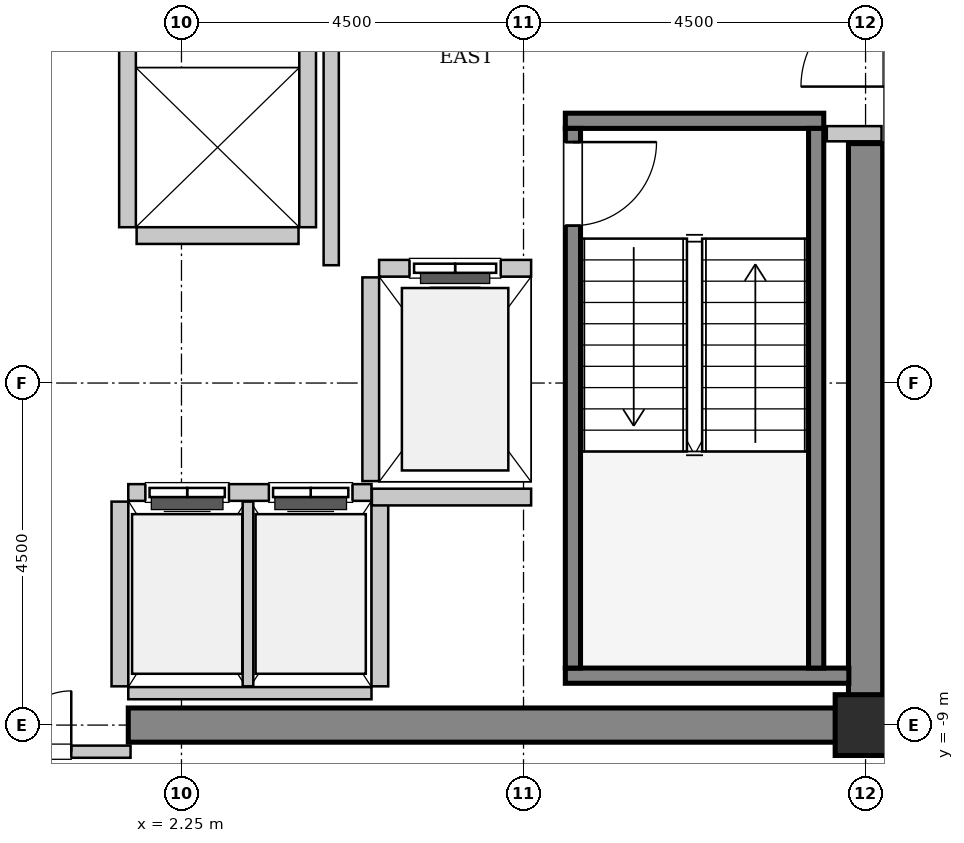
"""IFC4 building model, lengths in metres.
Left out: names, types, materials, properties, quantities, classifications, styles, units other than length and angle.
Written with IfcOpenShell. Run it as: python <this file> out.ifc"""

import sys

from ifc_helpers import new_model, si_unit, direction, frame, frame_2d, origin, origin_2d, place, context, subcontext, project, spatial, rectangle, hollow_rectangle, extrude, source, transform, mapped, element, fill, save


model = new_model("IFC4")
c1 = context("Model", 3, precision=1e-05, world=origin(), true_north=direction((0.0, 1.0)))
c2 = subcontext(c1, "Body", "Model", "MODEL_VIEW")
j1 = project(units=[si_unit("LENGTHUNIT", "METRE"), si_unit("PLANEANGLEUNIT", "RADIAN")], contexts=[c1])
p1 = place(None, origin())
s1 = spatial("IfcSite", under=j1, at=p1, CompositionType="ELEMENT")
p2 = place(p1, origin())
s2 = spatial("IfcBuilding", under=s1, at=p2, CompositionType="ELEMENT")
p3 = place(p2, frame((0.0, 0.0, 256.0)))
s3 = spatial("IfcBuildingStorey", under=s2, at=p3, CompositionType="ELEMENT", Elevation=256.0)
m1 = source(origin(), c2, "Body", "SweptSolid", [
    extrude(rectangle(XDim=9.925, YDim=0.45, at=frame_2d((4.962, 0.0))), origin(), (0.0, 0.0, 1.0), 3.8),
])
p4 = place(p3, frame((1.55, -9.0, 0.0), z_axis=(0.0, 0.0, 1.0), x_axis=(1.0, 0.0, 0.0)))
e1 = element("IfcWall", 1, at=p4, inside=s3, PredefinedType="SHEAR", context=c2, shape_type="MappedRepresentation", body=[
    mapped(m1, transform((0.0, 0.0, 0.0), x_axis=(1.0, 0.0, 0.0), y_axis=(0.0, 1.0, 0.0), z_axis=(0.0, 0.0, 1.0), scale=1.0)),
])
m2 = source(origin(), c2, "Body", "SweptSolid", [
    extrude(rectangle(XDim=7.425, YDim=0.45, at=frame_2d((3.712, 0.0))), origin(), (0.0, 0.0, 1.0), 3.8),
])
p5 = place(p3, frame((11.25, -8.775, 0.0), z_axis=(0.0, 0.0, 1.0), x_axis=(0.0, 1.0, 0.0)))
e2 = element("IfcWall", 2, at=p5, inside=s3, PredefinedType="SHEAR", context=c2, shape_type="MappedRepresentation", body=[
    mapped(m2, transform((0.0, 0.0, 0.0), x_axis=(1.0, 0.0, 0.0), y_axis=(0.0, 1.0, 0.0), z_axis=(0.0, 0.0, 1.0), scale=1.0)),
])
m3 = source(origin(), c2, "Body", "SweptSolid", [
    extrude(hollow_rectangle(XDim=0.8, YDim=0.8, WallThickness=0.04, InnerFilletRadius=0.04, OuterFilletRadius=0.08, at=origin_2d()), origin(), (0.0, 0.0, 1.0), 3.8),
])
p6 = place(p3, frame((11.25, -9.0, 0.0), z_axis=(0.0, 0.0, 1.0), x_axis=(1.0, 0.0, 0.0)))
e3 = element("IfcColumn", 3, at=p6, inside=s3, PredefinedType="COLUMN", context=c2, shape_type="MappedRepresentation", body=[
    mapped(m3, transform((0.0, 0.0, 0.0), x_axis=(1.0, 0.0, 0.0), y_axis=(0.0, 1.0, 0.0), z_axis=(0.0, 0.0, 1.0), scale=1.0)),
])
m4 = source(origin(), c2, "Body", "SweptSolid", [
    extrude(rectangle(XDim=3.4, YDim=0.2, at=frame_2d((1.7, 0.0))), origin(), (0.0, 0.0, 1.0), 3.8),
])
p7 = place(p3, frame((7.3, -1.05, 0.0), z_axis=(0.0, 0.0, 1.0), x_axis=(1.0, 0.0, 0.0)))
e4 = element("IfcWall", 4, at=p7, inside=s3, PredefinedType="SOLIDWALL", context=c2, shape_type="MappedRepresentation", body=[
    mapped(m4, transform((0.0, 0.0, 0.0), x_axis=(1.0, 0.0, 0.0), y_axis=(0.0, 1.0, 0.0), z_axis=(0.0, 0.0, 1.0), scale=1.0)),
])
m5 = source(origin(), c2, "Body", "SweptSolid", [
    extrude(rectangle(XDim=3.73, YDim=0.2, at=frame_2d((1.865, 0.0))), origin(), (0.0, 0.0, 1.0), 3.8),
])
p8 = place(p3, frame((7.3, -8.35, 0.0), z_axis=(0.0, 0.0, 1.0), x_axis=(1.0, 0.0, 0.0)))
e5 = element("IfcWall", 5, at=p8, inside=s3, PredefinedType="SOLIDWALL", context=c2, shape_type="MappedRepresentation", body=[
    mapped(m5, transform((0.0, 0.0, 0.0), x_axis=(1.0, 0.0, 0.0), y_axis=(0.0, 1.0, 0.0), z_axis=(0.0, 0.0, 1.0), scale=1.0)),
])
m6 = source(origin(), c2, "Body", "SweptSolid", [
    extrude(rectangle(XDim=7.1, YDim=0.2, at=frame_2d((3.55, 0.0))), origin(), (0.0, 0.0, 1.0), 3.8),
])
p9 = place(p3, frame((7.4, -1.15, 0.0), z_axis=(0.0, 0.0, 1.0), x_axis=(0.0, -1.0, 0.0)))
e6 = element("IfcWall", 6, at=p9, inside=s3, PredefinedType="SOLIDWALL", context=c2, shape_type="MappedRepresentation", body=[
    mapped(m6, transform((0.0, 0.0, 0.0), x_axis=(1.0, 0.0, 0.0), y_axis=(0.0, 1.0, 0.0), z_axis=(0.0, 0.0, 1.0), scale=1.0)),
])
p10 = place(p9, frame((0.18, 0.0, 0.0)))
e7 = element("IfcOpeningElement", 7, at=p10, cuts=e6, PredefinedType="OPENING", context=c2, shape_type="SweptSolid", body=[
    extrude(rectangle(XDim=1.1, YDim=2.15, at=frame_2d((0.55, 1.075))), frame((0.0, 0.11, 0.0), z_axis=(0.0, -1.0, 0.0), x_axis=(1.0, 0.0, 0.0)), (0.0, 0.0, 1.0), 0.22),
])
p11 = place(p3, frame((10.6, -1.15, 0.0), z_axis=(0.0, 0.0, 1.0), x_axis=(0.0, -1.0, 0.0)))
e8 = element("IfcWall", 8, at=p11, inside=s3, PredefinedType="SOLIDWALL", context=c2, shape_type="MappedRepresentation", body=[
    mapped(m6, transform((0.0, 0.0, 0.0), x_axis=(1.0, 0.0, 0.0), y_axis=(0.0, 1.0, 0.0), z_axis=(0.0, 0.0, 1.0), scale=1.0)),
])
m7 = source(origin(), c2, "Body", "SweptSolid", [
    extrude(rectangle(XDim=2.0, YDim=0.22, at=frame_2d((1.0, 0.0))), origin(), (0.0, 0.0, 1.0), 3.485),
])
p12 = place(p3, frame((6.85, -2.99, 0.0), z_axis=(0.0, 0.0, 1.0), x_axis=(-1.0, 0.0, 0.0)))
e9 = element("IfcWall", 9, at=p12, inside=s3, PredefinedType="SOLIDWALL", context=c2, shape_type="MappedRepresentation", body=[
    mapped(m7, transform((0.0, 0.0, 0.0), x_axis=(1.0, 0.0, 0.0), y_axis=(0.0, 1.0, 0.0), z_axis=(0.0, 0.0, 1.0), scale=1.0)),
])
p13 = place(p12, frame((0.4, 0.0, 0.0)))
e10 = element("IfcOpeningElement", 10, at=p13, cuts=e9, PredefinedType="OPENING", context=c2, shape_type="SweptSolid", body=[
    extrude(rectangle(XDim=1.2, YDim=2.2, at=frame_2d((0.6, 1.1))), frame((0.0, 0.12, 0.0), z_axis=(0.0, -1.0, 0.0), x_axis=(1.0, 0.0, 0.0)), (0.0, 0.0, 1.0), 0.24),
])
m8 = source(origin(), c2, "Body", "SweptSolid", [
    extrude(rectangle(XDim=2.68, YDim=0.22, at=frame_2d((1.34, 0.0))), origin(), (0.0, 0.0, 1.0), 3.485),
])
p14 = place(p3, frame((4.74, -3.11, 0.0), z_axis=(0.0, 0.0, 1.0), x_axis=(0.0, -1.0, 0.0)))
e11 = element("IfcWall", 11, at=p14, inside=s3, PredefinedType="SOLIDWALL", context=c2, shape_type="MappedRepresentation", body=[
    mapped(m8, transform((0.0, 0.0, 0.0), x_axis=(1.0, 0.0, 0.0), y_axis=(0.0, 1.0, 0.0), z_axis=(0.0, 0.0, 1.0), scale=1.0)),
])
m9 = source(origin(), c2, "Body", "SweptSolid", [
    extrude(rectangle(XDim=3.2, YDim=0.22, at=frame_2d((1.6, 0.0))), origin(), (0.0, 0.0, 1.0), 3.485),
])
p15 = place(p3, frame((4.75, -5.94, 0.0), z_axis=(0.0, 0.0, 1.0), x_axis=(-1.0, 0.0, 0.0)))
e12 = element("IfcWall", 12, at=p15, inside=s3, PredefinedType="SOLIDWALL", context=c2, shape_type="MappedRepresentation", body=[
    mapped(m9, transform((0.0, 0.0, 0.0), x_axis=(1.0, 0.0, 0.0), y_axis=(0.0, 1.0, 0.0), z_axis=(0.0, 0.0, 1.0), scale=1.0)),
])
p16 = place(p15, frame((1.875, 0.0, 0.0)))
e13 = element("IfcOpeningElement", 13, at=p16, cuts=e12, PredefinedType="OPENING", context=c2, shape_type="SweptSolid", body=[
    extrude(rectangle(XDim=1.1, YDim=2.2, at=frame_2d((0.55, 1.1))), frame((0.0, 0.12, 0.0), z_axis=(0.0, -1.0, 0.0), x_axis=(1.0, 0.0, 0.0)), (0.0, 0.0, 1.0), 0.24),
])
p17 = place(p15, frame((0.25, 0.0, 0.0)))
e14 = element("IfcOpeningElement", 14, at=p17, cuts=e12, PredefinedType="OPENING", context=c2, shape_type="SweptSolid", body=[
    extrude(rectangle(XDim=1.1, YDim=2.2, at=frame_2d((0.55, 1.1))), frame((0.0, 0.12, 0.0), z_axis=(0.0, -1.0, 0.0), x_axis=(1.0, 0.0, 0.0)), (0.0, 0.0, 1.0), 0.24),
])
m10 = source(origin(), c2, "Body", "SweptSolid", [
    extrude(rectangle(XDim=3.2, YDim=0.16, at=frame_2d((1.6, 0.0))), origin(), (0.0, 0.0, 1.0), 2.575),
])
p18 = place(p3, frame((1.55, -8.58, 0.0), z_axis=(0.0, 0.0, 1.0), x_axis=(1.0, 0.0, 0.0)))
e15 = element("IfcWall", 15, at=p18, inside=s3, PredefinedType="PARTITIONING", context=c2, shape_type="MappedRepresentation", body=[
    mapped(m10, transform((0.0, 0.0, 0.0), x_axis=(1.0, 0.0, 0.0), y_axis=(0.0, 1.0, 0.0), z_axis=(0.0, 0.0, 1.0), scale=1.0)),
])
m11 = source(origin(), c2, "Body", "SweptSolid", [
    extrude(rectangle(XDim=2.43, YDim=0.22, at=frame_2d((1.215, 0.0))), origin(), (0.0, 0.0, 1.0), 3.485),
])
p19 = place(p3, frame((1.44, -6.06, 0.0), z_axis=(0.0, 0.0, 1.0), x_axis=(0.0, -1.0, 0.0)))
e16 = element("IfcWall", 16, at=p19, inside=s3, PredefinedType="SOLIDWALL", context=c2, shape_type="MappedRepresentation", body=[
    mapped(m11, transform((0.0, 0.0, 0.0), x_axis=(1.0, 0.0, 0.0), y_axis=(0.0, 1.0, 0.0), z_axis=(0.0, 0.0, 1.0), scale=1.0)),
])
m12 = source(origin(), c2, "Body", "SweptSolid", [
    extrude(rectangle(XDim=2.43, YDim=0.14, at=frame_2d((1.215, 0.0))), origin(), (0.0, 0.0, 1.0), 3.485),
])
p20 = place(p3, frame((3.125, -8.49, 0.0), z_axis=(0.0, 0.0, 1.0), x_axis=(0.0, 1.0, 0.0)))
e17 = element("IfcWall", 17, at=p20, inside=s3, PredefinedType="PARTITIONING", context=c2, shape_type="MappedRepresentation", body=[
    mapped(m12, transform((0.0, 0.0, 0.0), x_axis=(1.0, 0.0, 0.0), y_axis=(0.0, 1.0, 0.0), z_axis=(0.0, 0.0, 1.0), scale=1.0)),
])
p21 = place(p3, frame((4.86, -8.49, 0.0), z_axis=(0.0, 0.0, 1.0), x_axis=(0.0, 1.0, 0.0)))
e18 = element("IfcWall", 18, at=p21, inside=s3, PredefinedType="SOLIDWALL", context=c2, shape_type="MappedRepresentation", body=[
    mapped(m11, transform((0.0, 0.0, 0.0), x_axis=(1.0, 0.0, 0.0), y_axis=(0.0, 1.0, 0.0), z_axis=(0.0, 0.0, 1.0), scale=1.0)),
])
m13 = source(origin(), c2, "Body", "SweptSolid", [
    extrude(rectangle(XDim=4.9, YDim=0.22, at=frame_2d((2.45, 0.0))), origin(), (0.0, 0.0, 1.0), 3.485),
])
for number, where, z_axis, x_axis in (
    (19, (1.54, 2.45, 0.0), (0.0, 0.0, 1.0), (0.0, -1.0, 0.0)),
    (20, (3.91, -2.45, 0.0), (0.0, 0.0, 1.0), (0.0, 1.0, 0.0)),
):
    element("IfcWall", number, at=place(p3, frame(where, z_axis=z_axis, x_axis=x_axis)), inside=s3, PredefinedType="SOLIDWALL", context=c2, shape_type="MappedRepresentation", body=[
        mapped(m13, transform((0.0, 0.0, 0.0), x_axis=(1.0, 0.0, 0.0), y_axis=(0.0, 1.0, 0.0), z_axis=(0.0, 0.0, 1.0), scale=1.0)),
    ])
m14 = source(origin(), c2, "Body", "SweptSolid", [
    extrude(rectangle(XDim=2.13, YDim=0.22, at=frame_2d((1.065, 0.0))), origin(), (0.0, 0.0, 1.0), 3.485),
])
p22 = place(p3, frame((1.66, -2.56, 0.0), z_axis=(0.0, 0.0, 1.0), x_axis=(1.0, 0.0, 0.0)))
e21 = element("IfcWall", 21, at=p22, inside=s3, PredefinedType="SOLIDWALL", context=c2, shape_type="MappedRepresentation", body=[
    mapped(m14, transform((0.0, 0.0, 0.0), x_axis=(1.0, 0.0, 0.0), y_axis=(0.0, 1.0, 0.0), z_axis=(0.0, 0.0, 1.0), scale=1.0)),
])
m15 = source(origin(), c2, "Body", "SweptSolid", [
    extrude(rectangle(XDim=2.095, YDim=0.22, at=frame_2d((1.048, 0.0))), origin(), (0.0, 0.0, 1.0), 3.485),
])
p23 = place(p3, frame((4.755, -6.0, 0.0), z_axis=(0.0, 0.0, 1.0), x_axis=(1.0, 0.0, 0.0)))
e22 = element("IfcWall", 22, at=p23, inside=s3, PredefinedType="SOLIDWALL", context=c2, shape_type="MappedRepresentation", body=[
    mapped(m15, transform((0.0, 0.0, 0.0), x_axis=(1.0, 0.0, 0.0), y_axis=(0.0, 1.0, 0.0), z_axis=(0.0, 0.0, 1.0), scale=1.0)),
])
m16 = source(origin(), c2, "Body", "SweptSolid", [
    extrude(rectangle(XDim=5.9, YDim=0.2, at=frame_2d((2.95, 0.0))), origin(), (0.0, 0.0, 1.0), 3.485),
])
p24 = place(p3, frame((4.22, -2.95, 0.0), z_axis=(0.0, 0.0, 1.0), x_axis=(0.0, 1.0, 0.0)))
e23 = element("IfcWall", 23, at=p24, inside=s3, PredefinedType="PARTITIONING", context=c2, shape_type="MappedRepresentation", body=[
    mapped(m16, transform((0.0, 0.0, 0.0), x_axis=(1.0, 0.0, 0.0), y_axis=(0.0, 1.0, 0.0), z_axis=(0.0, 0.0, 1.0), scale=1.0)),
])
m17 = source(origin(), c2, "Body", "SweptSolid", [
    extrude(rectangle(XDim=0.72, YDim=0.2, at=frame_2d((0.36, 0.0))), origin(), (0.0, 0.0, 1.0), 3.485),
])
p25 = place(p3, frame((10.74, -1.22, 0.0), z_axis=(0.0, 0.0, 1.0), x_axis=(1.0, 0.0, 0.0)))
e24 = element("IfcWall", 24, at=p25, inside=s3, PredefinedType="PARTITIONING", context=c2, shape_type="MappedRepresentation", body=[
    mapped(m17, transform((0.0, 0.0, 0.0), x_axis=(1.0, 0.0, 0.0), y_axis=(0.0, 1.0, 0.0), z_axis=(0.0, 0.0, 1.0), scale=1.0)),
])
m18 = source(origin(), c2, "Body", "SweptSolid", [
    extrude(rectangle(XDim=3.16, YDim=0.16, at=frame_2d((1.58, 0.0))), origin(), (0.0, 0.0, 1.0), 2.575),
])
p26 = place(p3, frame((-1.58, -9.35, 0.0), z_axis=(0.0, 0.0, 1.0), x_axis=(1.0, 0.0, 0.0)))
e25 = element("IfcWall", 25, at=p26, inside=s3, PredefinedType="PARTITIONING", context=c2, shape_type="MappedRepresentation", body=[
    mapped(m18, transform((0.0, 0.0, 0.0), x_axis=(1.0, 0.0, 0.0), y_axis=(0.0, 1.0, 0.0), z_axis=(0.0, 0.0, 1.0), scale=1.0)),
])
p27 = place(p26, frame((0.78, 0.0, 0.0)))
e26 = element("IfcOpeningElement", 26, at=p27, cuts=e25, PredefinedType="OPENING", context=c2, shape_type="SweptSolid", body=[
    extrude(rectangle(XDim=1.6, YDim=2.3, at=frame_2d((0.8, 1.15))), frame((0.0, 0.09, 0.0), z_axis=(0.0, -1.0, 0.0), x_axis=(1.0, 0.0, 0.0)), (0.0, 0.0, 1.0), 0.18),
])
m19 = source(origin(), c2, "Body", "SweptSolid", [
    extrude(rectangle(XDim=1.1, YDim=2.15, at=frame_2d((0.55, 1.075))), frame((0.0, 0.025, 0.0), z_axis=(0.0, -1.0, 0.0), x_axis=(1.0, 0.0, 0.0)), (0.0, 0.0, 1.0), 0.05),
])
p28 = place(p10, origin())
e27 = element("IfcDoor", 27, at=p28, inside=s3, OperationType="SINGLE_SWING_LEFT", PredefinedType="DOOR", context=c2, shape_type="MappedRepresentation", body=[
    mapped(m19, transform((0.0, 0.0, 0.0), x_axis=(1.0, 0.0, 0.0), y_axis=(0.0, 1.0, 0.0), z_axis=(0.0, 0.0, 1.0), scale=1.0)),
])
fill(e7, e27)
m20 = source(origin(), c2, "Body", "SweptSolid", [
    extrude(rectangle(XDim=1.2, YDim=2.2, at=frame_2d((0.6, 1.1))), frame((0.0, 0.025, 0.0), z_axis=(0.0, -1.0, 0.0), x_axis=(1.0, 0.0, 0.0)), (0.0, 0.0, 1.0), 0.05),
])
p29 = place(p13, origin())
e28 = element("IfcDoor", 28, at=p29, inside=s3, OperationType="SLIDING_TO_LEFT", PredefinedType="DOOR", context=c2, shape_type="MappedRepresentation", body=[
    mapped(m20, transform((0.0, 0.0, 0.0), x_axis=(1.0, 0.0, 0.0), y_axis=(0.0, 1.0, 0.0), z_axis=(0.0, 0.0, 1.0), scale=1.0)),
])
fill(e10, e28)
m21 = source(origin(), c2, "Body", "SweptSolid", [
    extrude(rectangle(XDim=1.1, YDim=2.2, at=frame_2d((0.55, 1.1))), frame((0.0, 0.025, 0.0), z_axis=(0.0, -1.0, 0.0), x_axis=(1.0, 0.0, 0.0)), (0.0, 0.0, 1.0), 0.05),
])
p30 = place(p16, origin())
e29 = element("IfcDoor", 29, at=p30, inside=s3, OperationType="DOUBLE_DOOR_SLIDING", PredefinedType="DOOR", context=c2, shape_type="MappedRepresentation", body=[
    mapped(m21, transform((0.0, 0.0, 0.0), x_axis=(1.0, 0.0, 0.0), y_axis=(0.0, 1.0, 0.0), z_axis=(0.0, 0.0, 1.0), scale=1.0)),
])
fill(e13, e29)
p31 = place(p17, origin())
e30 = element("IfcDoor", 30, at=p31, inside=s3, OperationType="DOUBLE_DOOR_SLIDING", PredefinedType="DOOR", context=c2, shape_type="MappedRepresentation", body=[
    mapped(m21, transform((0.0, 0.0, 0.0), x_axis=(1.0, 0.0, 0.0), y_axis=(0.0, 1.0, 0.0), z_axis=(0.0, 0.0, 1.0), scale=1.0)),
])
fill(e14, e30)
m22 = source(origin(), c2, "Body", "SweptSolid", [
    extrude(rectangle(XDim=1.6, YDim=2.3, at=frame_2d((0.8, 1.15))), frame((0.0, 0.025, 0.0), z_axis=(0.0, -1.0, 0.0), x_axis=(1.0, 0.0, 0.0)), (0.0, 0.0, 1.0), 0.05),
])
p32 = place(p27, origin())
e31 = element("IfcDoor", 31, at=p32, inside=s3, OperationType="DOUBLE_DOOR_SINGLE_SWING", PredefinedType="DOOR", context=c2, shape_type="MappedRepresentation", body=[
    mapped(m22, transform((0.0, 0.0, 0.0), x_axis=(1.0, 0.0, 0.0), y_axis=(0.0, 1.0, 0.0), z_axis=(0.0, 0.0, 1.0), scale=1.0)),
])
fill(e26, e31)
save(model, sys.argv[1])
